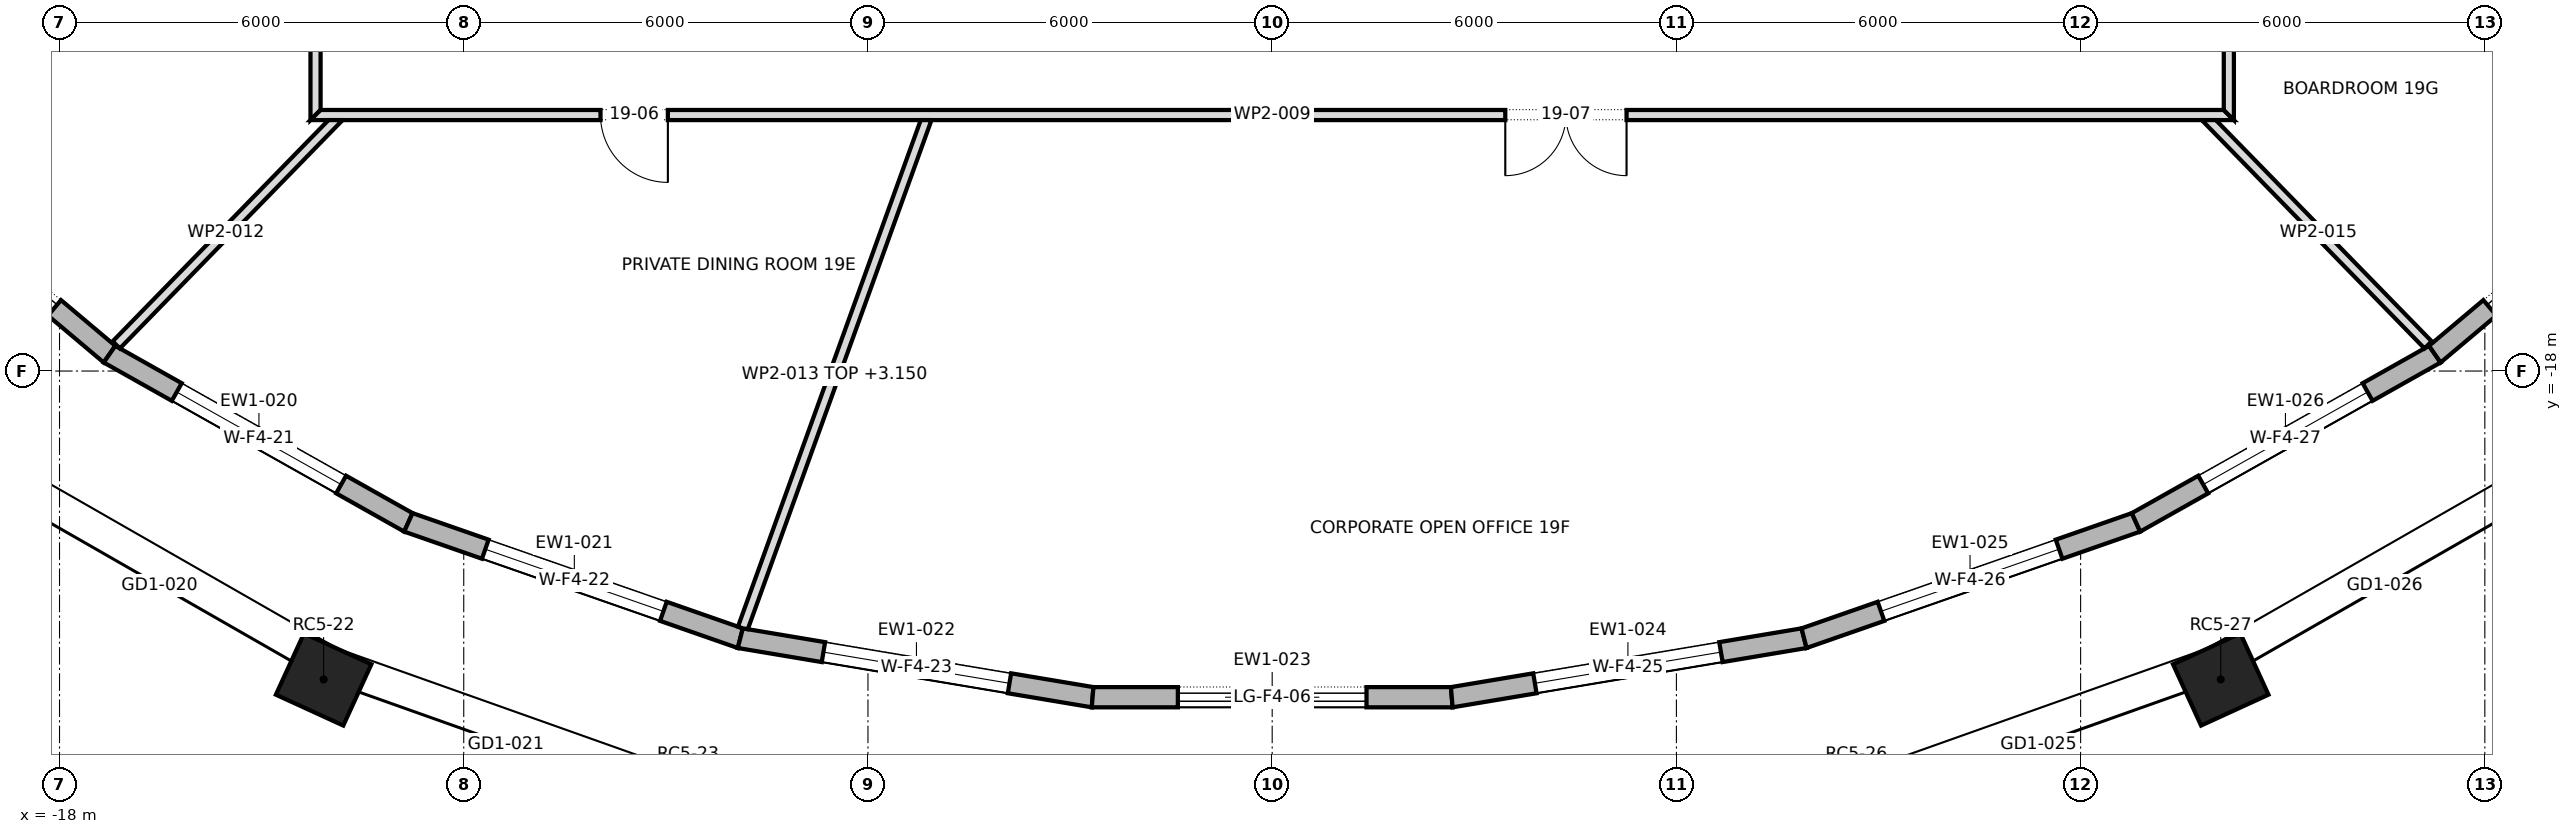
"""IFC4 building model, lengths in metres.
Left out: names, types, materials, properties, quantities, classifications, styles, units other than length and angle.
Written with IfcOpenShell. Run it as: python <this file> out.ifc"""

import sys

from ifc_helpers import new_model, si_unit, direction, frame, frame_2d, origin, origin_2d, place, context, subcontext, project, spatial, polyline, rectangle, outline, extrude, element, fill, save


model = new_model("IFC4")
c1 = context("Model", 3, precision=1e-05, world=origin(), true_north=direction((0.0, 1.0)))
c2 = subcontext(c1, "Body", "Model", "MODEL_VIEW")
j1 = project(units=[si_unit("LENGTHUNIT", "METRE"), si_unit("PLANEANGLEUNIT", "RADIAN")], contexts=[c1])
p1 = place(None, origin())
s1 = spatial("IfcSite", under=j1, at=p1, CompositionType="ELEMENT")
p2 = place(p1, origin())
s2 = spatial("IfcBuilding", under=s1, at=p2, CompositionType="ELEMENT")
p3 = place(p2, frame((0.0, 0.0, 268.3)))
s3 = spatial("IfcBuildingStorey", under=s2, at=p3, CompositionType="ELEMENT", Elevation=268.3)
for number, where, z_axis, x_axis in (
    (1, (-14.08, -22.579, 0.0), (0.0, 0.0, 1.0), (0.909, -0.417, 0.0)),
    (2, (14.08, -22.579, 0.0), (0.0, 0.0, 1.0), (0.909, 0.417, 0.0)),
):
    element("IfcColumn", number, at=place(p3, frame(where, z_axis=z_axis, x_axis=x_axis)), inside=s3, PredefinedType="COLUMN", context=c2, shape_type="SweptSolid", body=[
        extrude(rectangle(XDim=1.1, YDim=1.0, at=origin_2d()), origin(), (0.0, 0.0, 1.0), 4.0),
    ])
p4 = place(p3, frame((-21.032, -14.57, 0.0), z_axis=(0.0, 0.0, 1.0), x_axis=(0.764832940795, -0.644228664897, 0.0)))
e3 = element("IfcWall", 3, at=p4, inside=s3, PredefinedType="STANDARD", context=c2, shape_type="SweptSolid", body=[
    extrude(outline(polyline([(-0.015, -0.15), (4.949, -0.15), (4.921, 0.15), (0.015, 0.15), (-0.015, -0.15)])), origin(), (0.0, 0.0, 1.0), 3.7),
])
p5 = place(p4, frame((1.068, 0.0, 0.0)))
e4 = element("IfcOpeningElement", 4, at=p5, cuts=e3, PredefinedType="OPENING", context=c2, shape_type="SweptSolid", body=[
    extrude(rectangle(XDim=2.8, YDim=3.25, at=frame_2d((1.4, 1.625))), frame((0.0, 0.162, 0.0), z_axis=(0.0, -1.0, 0.0), x_axis=(1.0, 0.0, 0.0)), (0.0, 0.0, 1.0), 0.324),
])
p6 = place(p3, frame((-17.258, -17.75, 0.0), z_axis=(0.0, 0.0, 1.0), x_axis=(0.871433320402, -0.490513983585, 0.0)))
e5 = element("IfcWall", 5, at=p6, inside=s3, PredefinedType="STANDARD", context=c2, shape_type="SweptSolid", body=[
    extrude(outline(polyline([(-0.014, -0.15), (5.104, -0.15), (5.077, 0.15), (0.014, 0.15), (-0.014, -0.15)])), origin(), (0.0, 0.0, 1.0), 3.7),
])
p7 = place(p6, frame((1.145, 0.0, 0.6)))
e6 = element("IfcOpeningElement", 6, at=p7, cuts=e5, PredefinedType="OPENING", context=c2, shape_type="SweptSolid", body=[
    extrude(rectangle(XDim=2.8, YDim=2.65, at=frame_2d((1.4, 1.325))), frame((0.0, 0.162, 0.0), z_axis=(0.0, -1.0, 0.0), x_axis=(1.0, 0.0, 0.0)), (0.0, 0.0, 1.0), 0.324),
])
p8 = place(p3, frame((-12.822, -20.246, 0.0), z_axis=(0.0, 0.0, 1.0), x_axis=(0.9441693858, -0.329460423904, 0.0)))
e7 = element("IfcWall", 7, at=p8, inside=s3, PredefinedType="STANDARD", context=c2, shape_type="SweptSolid", body=[
    extrude(outline(polyline([(-0.013, -0.15), (5.231, -0.15), (5.206, 0.15), (0.013, 0.15), (-0.013, -0.15)])), origin(), (0.0, 0.0, 1.0), 3.7),
])
p9 = place(p8, frame((1.209, 0.0, 0.6)))
e8 = element("IfcOpeningElement", 8, at=p9, cuts=e7, PredefinedType="OPENING", context=c2, shape_type="SweptSolid", body=[
    extrude(rectangle(XDim=2.8, YDim=2.65, at=frame_2d((1.4, 1.325))), frame((0.0, 0.162, 0.0), z_axis=(0.0, -1.0, 0.0), x_axis=(1.0, 0.0, 0.0)), (0.0, 0.0, 1.0), 0.324),
])
p10 = place(p3, frame((-7.895, -21.966, 0.0), z_axis=(0.0, 0.0, 1.0), x_axis=(0.986250435411, -0.165257612993, 0.0)))
e9 = element("IfcWall", 9, at=p10, inside=s3, PredefinedType="STANDARD", context=c2, shape_type="SweptSolid", body=[
    extrude(outline(polyline([(-0.013, -0.15), (5.315, -0.15), (5.29, 0.15), (0.013, 0.15), (-0.013, -0.15)])), origin(), (0.0, 0.0, 1.0), 3.7),
])
p11 = place(p10, frame((1.251, 0.0, 0.6)))
e10 = element("IfcOpeningElement", 10, at=p11, cuts=e9, PredefinedType="OPENING", context=c2, shape_type="SweptSolid", body=[
    extrude(rectangle(XDim=2.8, YDim=2.65, at=frame_2d((1.4, 1.325))), frame((0.0, 0.162, 0.0), z_axis=(0.0, -1.0, 0.0), x_axis=(1.0, 0.0, 0.0)), (0.0, 0.0, 1.0), 0.324),
])
p12 = place(p3, frame((-2.666, -22.842, 0.0), z_axis=(0.0, 0.0, 1.0), x_axis=(1.0, 0.0, 0.0)))
e11 = element("IfcWall", 11, at=p12, inside=s3, PredefinedType="STANDARD", context=c2, shape_type="SweptSolid", body=[
    extrude(outline(polyline([(-0.012, -0.15), (5.344, -0.15), (5.319, 0.15), (0.012, 0.15), (-0.012, -0.15)])), origin(), (0.0, 0.0, 1.0), 3.7),
])
p13 = place(p12, frame((1.266, 0.0, 0.0)))
e12 = element("IfcOpeningElement", 12, at=p13, cuts=e11, PredefinedType="OPENING", context=c2, shape_type="SweptSolid", body=[
    extrude(rectangle(XDim=2.8, YDim=3.25, at=frame_2d((1.4, 1.625))), frame((0.0, 0.162, 0.0), z_axis=(0.0, -1.0, 0.0), x_axis=(1.0, 0.0, 0.0)), (0.0, 0.0, 1.0), 0.324),
])
p14 = place(p3, frame((2.666, -22.842, 0.0), z_axis=(0.0, 0.0, 1.0), x_axis=(0.986250435411, 0.165257612993, 0.0)))
e13 = element("IfcWall", 13, at=p14, inside=s3, PredefinedType="STANDARD", context=c2, shape_type="SweptSolid", body=[
    extrude(outline(polyline([(-0.012, -0.15), (5.315, -0.15), (5.29, 0.15), (0.012, 0.15), (-0.012, -0.15)])), origin(), (0.0, 0.0, 1.0), 3.7),
])
p15 = place(p14, frame((1.251, 0.0, 0.6)))
e14 = element("IfcOpeningElement", 14, at=p15, cuts=e13, PredefinedType="OPENING", context=c2, shape_type="SweptSolid", body=[
    extrude(rectangle(XDim=2.8, YDim=2.65, at=frame_2d((1.4, 1.325))), frame((0.0, 0.162, 0.0), z_axis=(0.0, -1.0, 0.0), x_axis=(1.0, 0.0, 0.0)), (0.0, 0.0, 1.0), 0.324),
])
p16 = place(p3, frame((7.895, -21.966, 0.0), z_axis=(0.0, 0.0, 1.0), x_axis=(0.9441693858, 0.329460423904, 0.0)))
e15 = element("IfcWall", 15, at=p16, inside=s3, PredefinedType="STANDARD", context=c2, shape_type="SweptSolid", body=[
    extrude(outline(polyline([(-0.013, -0.15), (5.232, -0.15), (5.205, 0.15), (0.013, 0.15), (-0.013, -0.15)])), origin(), (0.0, 0.0, 1.0), 3.7),
])
p17 = place(p16, frame((1.209, 0.0, 0.6)))
e16 = element("IfcOpeningElement", 16, at=p17, cuts=e15, PredefinedType="OPENING", context=c2, shape_type="SweptSolid", body=[
    extrude(rectangle(XDim=2.8, YDim=2.65, at=frame_2d((1.4, 1.325))), frame((0.0, 0.162, 0.0), z_axis=(0.0, -1.0, 0.0), x_axis=(1.0, 0.0, 0.0)), (0.0, 0.0, 1.0), 0.324),
])
p18 = place(p3, frame((12.822, -20.246, 0.0), z_axis=(0.0, 0.0, 1.0), x_axis=(0.871433320402, 0.490513983585, 0.0)))
e17 = element("IfcWall", 17, at=p18, inside=s3, PredefinedType="STANDARD", context=c2, shape_type="SweptSolid", body=[
    extrude(outline(polyline([(-0.013, -0.15), (5.104, -0.15), (5.076, 0.15), (0.013, 0.15), (-0.013, -0.15)])), origin(), (0.0, 0.0, 1.0), 3.7),
])
p19 = place(p18, frame((1.145, 0.0, 0.6)))
e18 = element("IfcOpeningElement", 18, at=p19, cuts=e17, PredefinedType="OPENING", context=c2, shape_type="SweptSolid", body=[
    extrude(rectangle(XDim=2.8, YDim=2.65, at=frame_2d((1.4, 1.325))), frame((0.0, 0.162, 0.0), z_axis=(0.0, -1.0, 0.0), x_axis=(1.0, 0.0, 0.0)), (0.0, 0.0, 1.0), 0.324),
])
p20 = place(p3, frame((17.258, -17.75, 0.0), z_axis=(0.0, 0.0, 1.0), x_axis=(0.764832940795, 0.644228664897, 0.0)))
e19 = element("IfcWall", 19, at=p20, inside=s3, PredefinedType="STANDARD", context=c2, shape_type="SweptSolid", body=[
    extrude(outline(polyline([(-0.014, -0.15), (4.95, -0.15), (4.92, 0.15), (0.014, 0.15), (-0.014, -0.15)])), origin(), (0.0, 0.0, 1.0), 3.7),
])
p21 = place(p20, frame((1.068, 0.0, 0.0)))
e20 = element("IfcOpeningElement", 20, at=p21, cuts=e19, PredefinedType="OPENING", context=c2, shape_type="SweptSolid", body=[
    extrude(rectangle(XDim=2.8, YDim=3.25, at=frame_2d((1.4, 1.625))), frame((0.0, 0.162, 0.0), z_axis=(0.0, -1.0, 0.0), x_axis=(1.0, 0.0, 0.0)), (0.0, 0.0, 1.0), 0.324),
])
p22 = place(p3, frame((-14.2, -14.275, 0.0), z_axis=(0.0, 0.0, 1.0), x_axis=(0.0, 1.0, 0.0)))
e21 = element("IfcWall", 21, at=p22, inside=s3, PredefinedType="PARTITIONING", context=c2, shape_type="SweptSolid", body=[
    extrude(outline(polyline([(0.15, -0.075), (2.033, -0.075), (3.917, -0.075), (5.8, -0.075), (7.683, -0.075), (9.567, -0.075), (11.45, -0.075), (13.333, -0.075), (15.217, -0.075), (17.1, -0.075), (18.983, -0.075), (20.866, -0.075), (22.75, -0.075), (24.633, -0.075), (26.517, -0.075), (28.4, -0.075), (28.55, 0.075), (28.55, 0.075), (26.646, 0.075), (24.743, 0.075), (22.84, 0.075), (20.937, 0.075), (19.033, 0.075), (17.13, 0.075), (15.227, 0.075), (13.323, 0.075), (11.42, 0.075), (9.517, 0.075), (7.613, 0.075), (5.71, 0.075), (3.807, 0.075), (1.903, 0.075), (0.0, 0.075), (0.15, -0.075)])), origin(), (0.0, 0.0, 1.0), 3.7),
])
p23 = place(p22, frame((20.5, 0.0, 0.0)))
e22 = element("IfcOpeningElement", 22, at=p23, cuts=e21, PredefinedType="OPENING", context=c2, shape_type="SweptSolid", body=[
    extrude(rectangle(XDim=1.0, YDim=2.1, at=frame_2d((0.5, 1.05))), frame((0.0, 0.087, 0.0), z_axis=(0.0, -1.0, 0.0), x_axis=(1.0, 0.0, 0.0)), (0.0, 0.0, 1.0), 0.174),
])
p24 = place(p22, frame((11.595, 0.0, 0.0)))
e23 = element("IfcOpeningElement", 23, at=p24, cuts=e21, PredefinedType="OPENING", context=c2, shape_type="SweptSolid", body=[
    extrude(rectangle(XDim=1.0, YDim=2.1, at=frame_2d((0.5, 1.05))), frame((0.0, 0.087, 0.0), z_axis=(0.0, -1.0, 0.0), x_axis=(1.0, 0.0, 0.0)), (0.0, 0.0, 1.0), 0.174),
])
p25 = place(p22, frame((15.225, 0.0, 0.0)))
e24 = element("IfcOpeningElement", 24, at=p25, cuts=e21, PredefinedType="OPENING", context=c2, shape_type="SweptSolid", body=[
    extrude(rectangle(XDim=1.0, YDim=2.1, at=frame_2d((0.5, 1.05))), frame((0.0, 0.087, 0.0), z_axis=(0.0, -1.0, 0.0), x_axis=(1.0, 0.0, 0.0)), (0.0, 0.0, 1.0), 0.174),
])
p26 = place(p22, frame((4.86, 0.0, 0.0)))
e25 = element("IfcOpeningElement", 25, at=p26, cuts=e21, PredefinedType="OPENING", context=c2, shape_type="SweptSolid", body=[
    extrude(rectangle(XDim=1.0, YDim=2.1, at=frame_2d((0.5, 1.05))), frame((0.0, 0.087, 0.0), z_axis=(0.0, -1.0, 0.0), x_axis=(1.0, 0.0, 0.0)), (0.0, 0.0, 1.0), 0.174),
])
p27 = place(p3, frame((-14.275, -14.2, 0.0), z_axis=(0.0, 0.0, 1.0), x_axis=(1.0, 0.0, 0.0)))
e26 = element("IfcWall", 26, at=p27, inside=s3, PredefinedType="PARTITIONING", context=c2, shape_type="SweptSolid", body=[
    extrude(outline(polyline([(28.55, -0.075), (28.55, -0.075), (28.4, 0.075), (26.517, 0.075), (24.633, 0.075), (22.75, 0.075), (20.866, 0.075), (18.983, 0.075), (17.1, 0.075), (15.217, 0.075), (13.333, 0.075), (11.45, 0.075), (9.567, 0.075), (7.683, 0.075), (5.8, 0.075), (3.917, 0.075), (2.033, 0.075), (0.15, 0.075), (0.0, -0.075), (1.903, -0.075), (3.807, -0.075), (5.71, -0.075), (7.613, -0.075), (9.517, -0.075), (11.42, -0.075), (13.323, -0.075), (15.227, -0.075), (17.13, -0.075), (19.033, -0.075), (20.937, -0.075), (22.84, -0.075), (24.743, -0.075), (26.646, -0.075), (28.55, -0.075)])), origin(), (0.0, 0.0, 1.0), 3.7),
])
p28 = place(p27, frame((4.305, 0.0, 0.0)))
e27 = element("IfcOpeningElement", 27, at=p28, cuts=e26, PredefinedType="OPENING", context=c2, shape_type="SweptSolid", body=[
    extrude(rectangle(XDim=1.0, YDim=2.1, at=frame_2d((0.5, 1.05))), frame((0.0, 0.087, 0.0), z_axis=(0.0, -1.0, 0.0), x_axis=(1.0, 0.0, 0.0)), (0.0, 0.0, 1.0), 0.174),
])
p29 = place(p27, frame((17.735, 0.0, 0.0)))
e28 = element("IfcOpeningElement", 28, at=p29, cuts=e26, PredefinedType="OPENING", context=c2, shape_type="SweptSolid", body=[
    extrude(rectangle(XDim=1.8, YDim=2.1, at=frame_2d((0.9, 1.05))), frame((0.0, 0.087, 0.0), z_axis=(0.0, -1.0, 0.0), x_axis=(1.0, 0.0, 0.0)), (0.0, 0.0, 1.0), 0.174),
])
p30 = place(p3, frame((-13.852, -14.223, 0.0), z_axis=(0.0, 0.0, 1.0), x_axis=(-0.69820654799, -0.715896372629, 0.0)))
e29 = element("IfcWall", 29, at=p30, inside=s3, PredefinedType="PARTITIONING", context=c2, shape_type="SweptSolid", body=[
    extrude(outline(polyline([(4.734, -0.075), (4.734, 0.075), (4.734, 0.075), (3.156, 0.075), (1.578, 0.075), (0.0, 0.075), (0.0, 0.075), (0.146, -0.075), (1.675, -0.075), (3.205, -0.075), (4.734, -0.075)])), origin(), (0.0, 0.0, 1.0), 3.7),
])
p31 = place(p3, frame((-5.128, -14.25, 0.0), z_axis=(0.0, 0.0, 1.0), x_axis=(-0.339369350229, -0.940653200773, 0.0)))
e30 = element("IfcWall", 30, at=p31, inside=s3, PredefinedType="PARTITIONING", context=c2, shape_type="SweptSolid", body=[
    extrude(outline(polyline([(8.047, -0.075), (8.047, -0.03), (8.047, 0.001), (8.033, 0.075), (6.427, 0.075), (4.82, 0.075), (3.213, 0.075), (1.607, 0.075), (0.0, 0.075), (0.0, 0.074), (0.054, -0.075), (2.052, -0.075), (4.05, -0.075), (6.049, -0.075), (8.047, -0.075)])), origin(), (0.0, 0.0, 1.0), 3.15),
])
p32 = place(p3, frame((13.852, -14.223, 0.0), z_axis=(0.0, 0.0, 1.0), x_axis=(0.69820654799, -0.715896372629, 0.0)))
e31 = element("IfcWall", 31, at=p32, inside=s3, PredefinedType="PARTITIONING", context=c2, shape_type="SweptSolid", body=[
    extrude(outline(polyline([(0.0, -0.075), (1.578, -0.075), (3.156, -0.075), (4.734, -0.075), (4.734, -0.075), (4.734, 0.075), (3.205, 0.075), (1.675, 0.075), (0.146, 0.075), (0.0, -0.075), (0.0, -0.075)])), origin(), (0.0, 0.0, 1.0), 3.7),
])
p33 = place(p3, frame((14.2, -14.275, 0.0), z_axis=(0.0, 0.0, 1.0), x_axis=(0.0, 1.0, 0.0)))
e32 = element("IfcWall", 32, at=p33, inside=s3, PredefinedType="PARTITIONING", context=c2, shape_type="SweptSolid", body=[
    extrude(outline(polyline([(28.55, -0.075), (28.55, -0.075), (28.4, 0.075), (26.517, 0.075), (24.633, 0.075), (22.75, 0.075), (20.866, 0.075), (18.983, 0.075), (17.1, 0.075), (15.217, 0.075), (13.333, 0.075), (11.45, 0.075), (9.567, 0.075), (7.683, 0.075), (5.8, 0.075), (3.917, 0.075), (2.033, 0.075), (0.15, 0.075), (0.0, -0.075), (1.903, -0.075), (3.807, -0.075), (5.71, -0.075), (7.613, -0.075), (9.517, -0.075), (11.42, -0.075), (13.323, -0.075), (15.227, -0.075), (17.13, -0.075), (19.033, -0.075), (20.937, -0.075), (22.84, -0.075), (24.743, -0.075), (26.646, -0.075), (28.55, -0.075)])), origin(), (0.0, 0.0, 1.0), 3.7),
])
p34 = place(p33, frame((3.48, 0.0, 0.0)))
e33 = element("IfcOpeningElement", 33, at=p34, cuts=e32, PredefinedType="OPENING", context=c2, shape_type="SweptSolid", body=[
    extrude(rectangle(XDim=1.0, YDim=2.1, at=frame_2d((0.5, 1.05))), frame((0.0, 0.087, 0.0), z_axis=(0.0, -1.0, 0.0), x_axis=(1.0, 0.0, 0.0)), (0.0, 0.0, 1.0), 0.174),
])
p35 = place(p33, frame((9.99, 0.0, 0.0)))
e34 = element("IfcOpeningElement", 34, at=p35, cuts=e32, PredefinedType="OPENING", context=c2, shape_type="SweptSolid", body=[
    extrude(rectangle(XDim=1.0, YDim=2.1, at=frame_2d((0.5, 1.05))), frame((0.0, 0.087, 0.0), z_axis=(0.0, -1.0, 0.0), x_axis=(1.0, 0.0, 0.0)), (0.0, 0.0, 1.0), 0.174),
])
p36 = place(p33, frame((15.0, 0.0, 0.0)))
e35 = element("IfcOpeningElement", 35, at=p36, cuts=e32, PredefinedType="OPENING", context=c2, shape_type="SweptSolid", body=[
    extrude(rectangle(XDim=1.0, YDim=2.1, at=frame_2d((0.5, 1.05))), frame((0.0, 0.087, 0.0), z_axis=(0.0, -1.0, 0.0), x_axis=(1.0, 0.0, 0.0)), (0.0, 0.0, 1.0), 0.174),
])
p37 = place(p33, frame((22.69, 0.0, 0.0)))
e36 = element("IfcOpeningElement", 36, at=p37, cuts=e32, PredefinedType="OPENING", context=c2, shape_type="SweptSolid", body=[
    extrude(rectangle(XDim=1.0, YDim=2.1, at=frame_2d((0.5, 1.05))), frame((0.0, 0.087, 0.0), z_axis=(0.0, -1.0, 0.0), x_axis=(1.0, 0.0, 0.0)), (0.0, 0.0, 1.0), 0.174),
])
p38 = place(p5, origin())
e37 = element("IfcDoor", 37, at=p38, inside=s3, OperationType="DOUBLE_DOOR_SLIDING", PredefinedType="DOOR", context=c2, shape_type="SweptSolid", body=[
    extrude(rectangle(XDim=2.8, YDim=3.25, at=frame_2d((1.4, 1.625))), frame((0.0, 0.025, 0.0), z_axis=(0.0, -1.0, 0.0), x_axis=(1.0, 0.0, 0.0)), (0.0, 0.0, 1.0), 0.05),
])
fill(e4, e37)
p39 = place(p7, origin())
e38 = element("IfcWindow", 38, at=p39, inside=s3, PartitioningType="DOUBLE_PANEL_VERTICAL", PredefinedType="WINDOW", context=c2, shape_type="SweptSolid", body=[
    extrude(rectangle(XDim=2.8, YDim=2.65, at=frame_2d((1.4, 1.325))), frame((0.0, 0.03, 0.0), z_axis=(0.0, -1.0, 0.0), x_axis=(1.0, 0.0, 0.0)), (0.0, 0.0, 1.0), 0.06),
])
fill(e6, e38)
p40 = place(p9, origin())
e39 = element("IfcWindow", 39, at=p40, inside=s3, PartitioningType="DOUBLE_PANEL_VERTICAL", PredefinedType="WINDOW", context=c2, shape_type="SweptSolid", body=[
    extrude(rectangle(XDim=2.8, YDim=2.65, at=frame_2d((1.4, 1.325))), frame((0.0, 0.03, 0.0), z_axis=(0.0, -1.0, 0.0), x_axis=(1.0, 0.0, 0.0)), (0.0, 0.0, 1.0), 0.06),
])
fill(e8, e39)
p41 = place(p11, origin())
e40 = element("IfcWindow", 40, at=p41, inside=s3, PartitioningType="DOUBLE_PANEL_VERTICAL", PredefinedType="WINDOW", context=c2, shape_type="SweptSolid", body=[
    extrude(rectangle(XDim=2.8, YDim=2.65, at=frame_2d((1.4, 1.325))), frame((0.0, 0.03, 0.0), z_axis=(0.0, -1.0, 0.0), x_axis=(1.0, 0.0, 0.0)), (0.0, 0.0, 1.0), 0.06),
])
fill(e10, e40)
p42 = place(p13, origin())
e41 = element("IfcDoor", 41, at=p42, inside=s3, OperationType="DOUBLE_DOOR_SLIDING", PredefinedType="DOOR", context=c2, shape_type="SweptSolid", body=[
    extrude(rectangle(XDim=2.8, YDim=3.25, at=frame_2d((1.4, 1.625))), frame((0.0, 0.025, 0.0), z_axis=(0.0, -1.0, 0.0), x_axis=(1.0, 0.0, 0.0)), (0.0, 0.0, 1.0), 0.05),
])
fill(e12, e41)
p43 = place(p15, origin())
e42 = element("IfcWindow", 42, at=p43, inside=s3, PartitioningType="DOUBLE_PANEL_VERTICAL", PredefinedType="WINDOW", context=c2, shape_type="SweptSolid", body=[
    extrude(rectangle(XDim=2.8, YDim=2.65, at=frame_2d((1.4, 1.325))), frame((0.0, 0.03, 0.0), z_axis=(0.0, -1.0, 0.0), x_axis=(1.0, 0.0, 0.0)), (0.0, 0.0, 1.0), 0.06),
])
fill(e14, e42)
p44 = place(p17, origin())
e43 = element("IfcWindow", 43, at=p44, inside=s3, PartitioningType="DOUBLE_PANEL_VERTICAL", PredefinedType="WINDOW", context=c2, shape_type="SweptSolid", body=[
    extrude(rectangle(XDim=2.8, YDim=2.65, at=frame_2d((1.4, 1.325))), frame((0.0, 0.03, 0.0), z_axis=(0.0, -1.0, 0.0), x_axis=(1.0, 0.0, 0.0)), (0.0, 0.0, 1.0), 0.06),
])
fill(e16, e43)
p45 = place(p19, origin())
e44 = element("IfcWindow", 44, at=p45, inside=s3, PartitioningType="DOUBLE_PANEL_VERTICAL", PredefinedType="WINDOW", context=c2, shape_type="SweptSolid", body=[
    extrude(rectangle(XDim=2.8, YDim=2.65, at=frame_2d((1.4, 1.325))), frame((0.0, 0.03, 0.0), z_axis=(0.0, -1.0, 0.0), x_axis=(1.0, 0.0, 0.0)), (0.0, 0.0, 1.0), 0.06),
])
fill(e18, e44)
p46 = place(p21, origin())
e45 = element("IfcDoor", 45, at=p46, inside=s3, OperationType="DOUBLE_DOOR_SLIDING", PredefinedType="DOOR", context=c2, shape_type="SweptSolid", body=[
    extrude(rectangle(XDim=2.8, YDim=3.25, at=frame_2d((1.4, 1.625))), frame((0.0, 0.025, 0.0), z_axis=(0.0, -1.0, 0.0), x_axis=(1.0, 0.0, 0.0)), (0.0, 0.0, 1.0), 0.05),
])
fill(e20, e45)
p47 = place(p28, frame((1.0, 0.0, 0.0), z_axis=(0.0, 0.0, 1.0), x_axis=(-1.0, 0.0, 0.0)))
e46 = element("IfcDoor", 46, at=p47, inside=s3, OperationType="SINGLE_SWING_RIGHT", PredefinedType="DOOR", context=c2, shape_type="SweptSolid", body=[
    extrude(rectangle(XDim=1.0, YDim=2.1, at=frame_2d((0.5, 1.05))), frame((0.0, 0.025, 0.0), z_axis=(0.0, -1.0, 0.0), x_axis=(1.0, 0.0, 0.0)), (0.0, 0.0, 1.0), 0.05),
])
fill(e27, e46)
p48 = place(p29, frame((1.8, 0.0, 0.0), z_axis=(0.0, 0.0, 1.0), x_axis=(-1.0, 0.0, 0.0)))
e47 = element("IfcDoor", 47, at=p48, inside=s3, OperationType="DOUBLE_DOOR_SINGLE_SWING", PredefinedType="DOOR", context=c2, shape_type="SweptSolid", body=[
    extrude(rectangle(XDim=1.8, YDim=2.1, at=frame_2d((0.9, 1.05))), frame((0.0, 0.025, 0.0), z_axis=(0.0, -1.0, 0.0), x_axis=(1.0, 0.0, 0.0)), (0.0, 0.0, 1.0), 0.05),
])
fill(e28, e47)
save(model, sys.argv[1])
